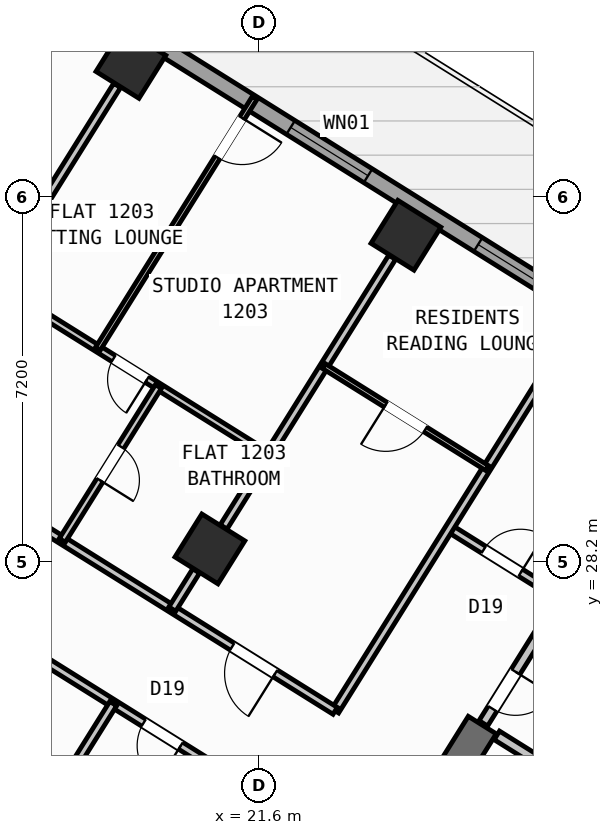
"""IFC4 building model, lengths in metres.
Left out: names, types, materials, properties, quantities, classifications, styles, units other than length and angle.
Written with IfcOpenShell. Run it as: python <this file> out.ifc"""

import sys

from ifc_helpers import new_model, si_unit, direction, frame, frame_2d, origin, origin_2d, place, context, subcontext, project, spatial, rectangle, hollow_rectangle, extrude, source, transform, mapped, element, fill, save


model = new_model("IFC4")
c1 = context("Model", 3, precision=1e-05, world=origin(), true_north=direction((0.0, 1.0)))
c2 = subcontext(c1, "Body", "Model", "MODEL_VIEW")
j1 = project(units=[si_unit("LENGTHUNIT", "METRE"), si_unit("PLANEANGLEUNIT", "RADIAN")], contexts=[c1])
p1 = place(None, origin())
s1 = spatial("IfcSite", under=j1, at=p1, CompositionType="ELEMENT")
p2 = place(p1, origin())
s2 = spatial("IfcBuilding", under=s1, at=p2, CompositionType="ELEMENT")
p3 = place(p2, frame((0.0, 0.0, 49.2)))
s3 = spatial("IfcBuildingStorey", under=s2, at=p3, CompositionType="ELEMENT", Elevation=49.2)
p4 = place(p3, frame((26.007, 24.976, 0.0), z_axis=(0.0, 0.0, 1.0), x_axis=(-0.529916319127, -0.848049936456, 0.0)))
e1 = element("IfcWall", 1, at=p4, inside=s3, PredefinedType="SHEAR", context=c2, shape_type="SweptSolid", body=[
    extrude(rectangle(XDim=6.375, YDim=0.65, at=frame_2d((3.188, 0.0))), origin(), (0.0, 0.0, 1.0), 3.35),
])
m1 = source(origin(), c2, "Body", "SweptSolid", [
    extrude(hollow_rectangle(XDim=1.0, YDim=1.0, WallThickness=0.04, at=origin_2d()), origin(), (0.0, 0.0, 1.0), 3.6),
])
for number, where, z_axis, x_axis in (
    (2, (24.5, 34.643, 0.0), (0.0, 0.0, 1.0), (-0.848, 0.53, 0.0)),
    (3, (20.632, 28.452, 0.0), (0.0, 0.0, 1.0), (-0.848, 0.53, 0.0)),
    (4, (19.073, 38.034, 0.0), (0.0, 0.0, 1.0), (-0.848, 0.53, 0.0)),
):
    element("IfcColumn", number, at=place(p3, frame(where, z_axis=z_axis, x_axis=x_axis)), inside=s3, PredefinedType="COLUMN", context=c2, shape_type="MappedRepresentation", body=[
        mapped(m1, transform((0.0, 0.0, 0.0), scale=1.0)),
    ])
p5 = place(p3, frame((14.138, 41.825, 0.0), z_axis=(0.0, 0.0, 1.0), x_axis=(0.848046498049, -0.529921821731, 0.0)))
e5 = element("IfcWall", 5, at=p5, inside=s3, PredefinedType="STANDARD", context=c2, shape_type="SweptSolid", body=[
    extrude(rectangle(XDim=31.588, YDim=0.32, at=frame_2d((15.794, 0.0))), origin(), (0.0, 0.0, 1.0), 3.35),
])
p6 = place(p5, frame((3.159, 0.0, 0.0)))
e6 = element("IfcOpeningElement", 6, at=p6, cuts=e5, PredefinedType="OPENING", context=c2, shape_type="SweptSolid", body=[
    extrude(rectangle(XDim=1.05, YDim=2.15, at=frame_2d((0.525, 1.075))), frame((0.0, 0.17, 0.0), z_axis=(0.0, -1.0, 0.0), x_axis=(1.0, 0.0, 0.0)), (0.0, 0.0, 1.0), 0.34),
])
p7 = place(p5, frame((0.906, 0.0, 1.0)))
e7 = element("IfcOpeningElement", 7, at=p7, cuts=e5, PredefinedType="OPENING", context=c2, shape_type="SweptSolid", body=[
    extrude(rectangle(XDim=0.9, YDim=1.25, at=frame_2d((0.45, 0.625))), frame((0.0, 0.17, 0.0), z_axis=(0.0, -1.0, 0.0), x_axis=(1.0, 0.0, 0.0)), (0.0, 0.0, 1.0), 0.34),
])
p8 = place(p5, frame((9.537, 0.0, 0.85)))
e8 = element("IfcOpeningElement", 8, at=p8, cuts=e5, PredefinedType="OPENING", context=c2, shape_type="SweptSolid", body=[
    extrude(rectangle(XDim=1.8, YDim=1.5, at=frame_2d((0.9, 0.75))), frame((0.0, 0.17, 0.0), z_axis=(0.0, -1.0, 0.0), x_axis=(1.0, 0.0, 0.0)), (0.0, 0.0, 1.0), 0.34),
])
p9 = place(p5, frame((13.899, 0.0, 0.85)))
e9 = element("IfcOpeningElement", 9, at=p9, cuts=e5, PredefinedType="OPENING", context=c2, shape_type="SweptSolid", body=[
    extrude(rectangle(XDim=1.5, YDim=1.5, at=frame_2d((0.75, 0.75))), frame((0.0, 0.17, 0.0), z_axis=(0.0, -1.0, 0.0), x_axis=(1.0, 0.0, 0.0)), (0.0, 0.0, 1.0), 0.34),
])
p10 = place(p5, frame((22.019, 0.0, 0.95)))
e10 = element("IfcOpeningElement", 10, at=p10, cuts=e5, PredefinedType="OPENING", context=c2, shape_type="SweptSolid", body=[
    extrude(rectangle(XDim=1.2, YDim=1.4, at=frame_2d((0.6, 0.7))), frame((0.0, 0.17, 0.0), z_axis=(0.0, -1.0, 0.0), x_axis=(1.0, 0.0, 0.0)), (0.0, 0.0, 1.0), 0.34),
])
p11 = place(p5, frame((27.569, 0.0, 0.95)))
e11 = element("IfcOpeningElement", 11, at=p11, cuts=e5, PredefinedType="OPENING", context=c2, shape_type="SweptSolid", body=[
    extrude(rectangle(XDim=1.2, YDim=1.4, at=frame_2d((0.6, 0.7))), frame((0.0, 0.17, 0.0), z_axis=(0.0, -1.0, 0.0), x_axis=(1.0, 0.0, 0.0)), (0.0, 0.0, 1.0), 0.34),
])
p12 = place(p3, frame((31.525, 21.504, 0.0), z_axis=(0.0, 0.0, 1.0), x_axis=(-0.848044998614, 0.529924221305, 0.0)))
e12 = element("IfcWall", 12, at=p12, inside=s3, PredefinedType="STANDARD", context=c2, shape_type="SweptSolid", body=[
    extrude(rectangle(XDim=6.168, YDim=0.2, at=frame_2d((3.084, 0.0))), origin(), (0.0, 0.0, 1.0), 3.34),
])
p13 = place(p12, frame((4.4, 0.0, 0.0)))
e13 = element("IfcOpeningElement", 13, at=p13, cuts=e12, PredefinedType="OPENING", context=c2, shape_type="SweptSolid", body=[
    extrude(rectangle(XDim=0.86, YDim=2.05, at=frame_2d((0.43, 1.025))), frame((0.0, 0.11, 0.0), z_axis=(0.0, -1.0, 0.0), x_axis=(1.0, 0.0, 0.0)), (0.0, 0.0, 1.0), 0.22),
])
p14 = place(p12, frame((0.35, 0.0, 0.0)))
e14 = element("IfcOpeningElement", 14, at=p14, cuts=e12, PredefinedType="OPENING", context=c2, shape_type="SweptSolid", body=[
    extrude(rectangle(XDim=0.86, YDim=2.05, at=frame_2d((0.43, 1.025))), frame((0.0, 0.11, 0.0), z_axis=(0.0, -1.0, 0.0), x_axis=(1.0, 0.0, 0.0)), (0.0, 0.0, 1.0), 0.22),
])
p15 = place(p3, frame((27.596, 27.52, 0.0), z_axis=(0.0, 0.0, 1.0), x_axis=(-0.529865479138, -0.848081702443, 0.0)))
e15 = element("IfcWall", 15, at=p15, inside=s3, PredefinedType="STANDARD", context=c2, shape_type="SweptSolid", body=[
    extrude(rectangle(XDim=2.96, YDim=0.2, at=frame_2d((1.48, 0.0))), origin(), (0.0, 0.0, 1.0), 3.34),
])
p16 = place(p15, frame((1.76, 0.0, 0.0)))
e16 = element("IfcOpeningElement", 16, at=p16, cuts=e15, PredefinedType="OPENING", context=c2, shape_type="SweptSolid", body=[
    extrude(rectangle(XDim=0.86, YDim=2.05, at=frame_2d((0.43, 1.025))), frame((0.0, 0.11, 0.0), z_axis=(0.0, -1.0, 0.0), x_axis=(1.0, 0.0, 0.0)), (0.0, 0.0, 1.0), 0.22),
])
p17 = place(p3, frame((27.57, 27.478, 0.0), z_axis=(0.0, 0.0, 1.0), x_axis=(-0.848050851465, 0.529914854792, 0.0)))
e17 = element("IfcWall", 17, at=p17, inside=s3, PredefinedType="PARTITIONING", context=c2, shape_type="SweptSolid", body=[
    extrude(rectangle(XDim=2.61, YDim=0.16, at=frame_2d((1.305, 0.0))), origin(), (0.0, 0.0, 1.0), 3.34),
])
p18 = place(p17, frame((0.95, 0.0, 0.0)))
e18 = element("IfcOpeningElement", 18, at=p18, cuts=e17, PredefinedType="OPENING", context=c2, shape_type="SweptSolid", body=[
    extrude(rectangle(XDim=0.86, YDim=2.05, at=frame_2d((0.43, 1.025))), frame((0.0, 0.09, 0.0), z_axis=(0.0, -1.0, 0.0), x_axis=(1.0, 0.0, 0.0)), (0.0, 0.0, 1.0), 0.18),
])
p19 = place(p3, frame((27.953, 33.016, 0.0), z_axis=(0.0, 0.0, 1.0), x_axis=(-0.529903001606, -0.848058257957, 0.0)))
e19 = element("IfcWall", 19, at=p19, inside=s3, PredefinedType="PARTITIONING", context=c2, shape_type="SweptSolid", body=[
    extrude(rectangle(XDim=9.15, YDim=0.16, at=frame_2d((4.575, 0.0))), origin(), (0.0, 0.0, 1.0), 3.34),
])
p20 = place(p3, frame((23.104, 25.256, 0.0), z_axis=(0.0, 0.0, 1.0), x_axis=(-0.848041752158, 0.529929416617, 0.0)))
e20 = element("IfcWall", 20, at=p20, inside=s3, PredefinedType="PARTITIONING", context=c2, shape_type="SweptSolid", body=[
    extrude(rectangle(XDim=16.73, YDim=0.16, at=frame_2d((8.365, 0.0))), origin(), (0.0, 0.0, 1.0), 3.34),
])
p21 = place(p20, frame((1.395, 0.0, 0.0)))
e21 = element("IfcOpeningElement", 21, at=p21, cuts=e20, PredefinedType="OPENING", context=c2, shape_type="SweptSolid", body=[
    extrude(rectangle(XDim=1.0, YDim=2.1, at=frame_2d((0.5, 1.05))), frame((0.0, 0.09, 0.0), z_axis=(0.0, -1.0, 0.0), x_axis=(1.0, 0.0, 0.0)), (0.0, 0.0, 1.0), 0.18),
])
p22 = place(p20, frame((7.82, 0.0, 0.0)))
e22 = element("IfcOpeningElement", 22, at=p22, cuts=e20, PredefinedType="OPENING", context=c2, shape_type="SweptSolid", body=[
    extrude(rectangle(XDim=1.0, YDim=2.1, at=frame_2d((0.5, 1.05))), frame((0.0, 0.09, 0.0), z_axis=(0.0, -1.0, 0.0), x_axis=(1.0, 0.0, 0.0)), (0.0, 0.0, 1.0), 0.18),
])
p23 = place(p20, frame((14.76, 0.0, 0.0)))
e23 = element("IfcOpeningElement", 23, at=p23, cuts=e20, PredefinedType="OPENING", context=c2, shape_type="SweptSolid", body=[
    extrude(rectangle(XDim=1.0, YDim=2.1, at=frame_2d((0.5, 1.05))), frame((0.0, 0.09, 0.0), z_axis=(0.0, -1.0, 0.0), x_axis=(1.0, 0.0, 0.0)), (0.0, 0.0, 1.0), 0.18),
])
p24 = place(p3, frame((21.938, 23.391, 0.0), z_axis=(0.0, 0.0, 1.0), x_axis=(-0.848045850158, 0.529922858565, 0.0)))
e24 = element("IfcWall", 24, at=p24, inside=s3, PredefinedType="PARTITIONING", context=c2, shape_type="SweptSolid", body=[
    extrude(rectangle(XDim=16.73, YDim=0.16, at=frame_2d((8.365, 0.0))), origin(), (0.0, 0.0, 1.0), 3.34),
])
p25 = place(p24, frame((2.22, 0.0, 0.0)))
e25 = element("IfcOpeningElement", 25, at=p25, cuts=e24, PredefinedType="OPENING", context=c2, shape_type="SweptSolid", body=[
    extrude(rectangle(XDim=0.86, YDim=2.05, at=frame_2d((0.43, 1.025))), frame((0.0, 0.09, 0.0), z_axis=(0.0, -1.0, 0.0), x_axis=(1.0, 0.0, 0.0)), (0.0, 0.0, 1.0), 0.18),
])
p26 = place(p24, frame((6.49, 0.0, 0.0)))
e26 = element("IfcOpeningElement", 26, at=p26, cuts=e24, PredefinedType="OPENING", context=c2, shape_type="SweptSolid", body=[
    extrude(rectangle(XDim=1.0, YDim=2.1, at=frame_2d((0.5, 1.05))), frame((0.0, 0.09, 0.0), z_axis=(0.0, -1.0, 0.0), x_axis=(1.0, 0.0, 0.0)), (0.0, 0.0, 1.0), 0.18),
])
p27 = place(p24, frame((11.14, 0.0, 0.0)))
e27 = element("IfcOpeningElement", 27, at=p27, cuts=e24, PredefinedType="OPENING", context=c2, shape_type="SweptSolid", body=[
    extrude(rectangle(XDim=1.0, YDim=2.1, at=frame_2d((0.5, 1.05))), frame((0.0, 0.09, 0.0), z_axis=(0.0, -1.0, 0.0), x_axis=(1.0, 0.0, 0.0)), (0.0, 0.0, 1.0), 0.18),
])
p28 = place(p3, frame((18.724, 25.399, 0.0), z_axis=(0.0, 0.0, 1.0), x_axis=(-0.529930102756, -0.848041323399, 0.0)))
e28 = element("IfcWall", 28, at=p28, inside=s3, PredefinedType="PARTITIONING", context=c2, shape_type="SweptSolid", body=[
    extrude(rectangle(XDim=3.188, YDim=0.16, at=frame_2d((1.594, 0.0))), origin(), (0.0, 0.0, 1.0), 2.725),
])
p29 = place(p3, frame((24.229, 34.209, 0.0), z_axis=(0.0, 0.0, 1.0), x_axis=(-0.529897533635, -0.848061674554, 0.0)))
e29 = element("IfcWall", 29, at=p29, inside=s3, PredefinedType="PARTITIONING", context=c2, shape_type="SweptSolid", body=[
    extrude(rectangle(XDim=6.276, YDim=0.16, at=frame_2d((3.138, 0.0))), origin(), (0.0, 0.0, 1.0), 2.725),
])
p30 = place(p3, frame((20.361, 28.018, 0.0), z_axis=(0.0, 0.0, 1.0), x_axis=(-0.529900064649, -0.848060093086, 0.0)))
e30 = element("IfcWall", 30, at=p30, inside=s3, PredefinedType="PARTITIONING", context=c2, shape_type="SweptSolid", body=[
    extrude(rectangle(XDim=0.888, YDim=0.16, at=frame_2d((0.444, 0.0))), origin(), (0.0, 0.0, 1.0), 2.725),
])
p31 = place(p3, frame((26.099, 30.05, 0.0), z_axis=(0.0, 0.0, 1.0), x_axis=(-0.84803087207, 0.529946827537, 0.0)))
e31 = element("IfcWall", 31, at=p31, inside=s3, PredefinedType="PARTITIONING", context=c2, shape_type="SweptSolid", body=[
    extrude(rectangle(XDim=3.79, YDim=0.11, at=frame_2d((1.895, 0.0))), origin(), (0.0, 0.0, 1.0), 3.34),
])
p32 = place(p31, frame((1.435, 0.0, 0.0)))
e32 = element("IfcOpeningElement", 32, at=p32, cuts=e31, PredefinedType="OPENING", context=c2, shape_type="SweptSolid", body=[
    extrude(rectangle(XDim=0.92, YDim=2.08, at=frame_2d((0.46, 1.04))), frame((0.0, 0.065, 0.0), z_axis=(0.0, -1.0, 0.0), x_axis=(1.0, 0.0, 0.0)), (0.0, 0.0, 1.0), 0.13),
])
p33 = place(p3, frame((18.802, 37.6, 0.0), z_axis=(0.0, 0.0, 1.0), x_axis=(-0.529915015264, -0.848050751193, 0.0)))
e33 = element("IfcWall", 33, at=p33, inside=s3, PredefinedType="PARTITIONING", context=c2, shape_type="SweptSolid", body=[
    extrude(rectangle(XDim=6.276, YDim=0.16, at=frame_2d((3.138, 0.0))), origin(), (0.0, 0.0, 1.0), 2.725),
])
p34 = place(p3, frame((21.787, 30.301, 0.0), z_axis=(0.0, 0.0, 1.0), x_axis=(-0.848049732085, 0.529916646191, 0.0)))
e34 = element("IfcWall", 34, at=p34, inside=s3, PredefinedType="PLUMBINGWALL", context=c2, shape_type="SweptSolid", body=[
    extrude(rectangle(XDim=6.4, YDim=0.14, at=frame_2d((3.2, 0.0))), origin(), (0.0, 0.0, 1.0), 3.34),
])
p35 = place(p34, frame((2.824, 0.0, 0.0)))
e35 = element("IfcOpeningElement", 35, at=p35, cuts=e34, PredefinedType="OPENING", context=c2, shape_type="SweptSolid", body=[
    extrude(rectangle(XDim=0.78, YDim=2.05, at=frame_2d((0.39, 1.025))), frame((0.0, 0.08, 0.0), z_axis=(0.0, -1.0, 0.0), x_axis=(1.0, 0.0, 0.0)), (0.0, 0.0, 1.0), 0.16),
])
p36 = place(p3, frame((19.616, 31.657, 0.0), z_axis=(0.0, 0.0, 1.0), x_axis=(-0.529876336437, -0.84807491891, 0.0)))
e36 = element("IfcWall", 36, at=p36, inside=s3, PredefinedType="PLUMBINGWALL", context=c2, shape_type="SweptSolid", body=[
    extrude(rectangle(XDim=3.58, YDim=0.14, at=frame_2d((1.79, 0.0))), origin(), (0.0, 0.0, 1.0), 3.34),
])
p37 = place(p36, frame((1.4, 0.0, 0.0)))
e37 = element("IfcOpeningElement", 37, at=p37, cuts=e36, PredefinedType="OPENING", context=c2, shape_type="SweptSolid", body=[
    extrude(rectangle(XDim=0.78, YDim=2.05, at=frame_2d((0.39, 1.025))), frame((0.0, 0.08, 0.0), z_axis=(0.0, -1.0, 0.0), x_axis=(1.0, 0.0, 0.0)), (0.0, 0.0, 1.0), 0.16),
])
p38 = place(p3, frame((21.517, 37.356, 0.0), z_axis=(0.0, 0.0, 1.0), x_axis=(-0.529916267533, -0.848049968695, 0.0)))
e38 = element("IfcWall", 38, at=p38, inside=s3, PredefinedType="PARTITIONING", context=c2, shape_type="SweptSolid", body=[
    extrude(rectangle(XDim=5.84, YDim=0.11, at=frame_2d((2.92, 0.0))), origin(), (0.0, 0.0, 1.0), 3.34),
])
p39 = place(p38, frame((0.47, 0.0, 0.0)))
e39 = element("IfcOpeningElement", 39, at=p39, cuts=e38, PredefinedType="OPENING", context=c2, shape_type="SweptSolid", body=[
    extrude(rectangle(XDim=0.92, YDim=2.08, at=frame_2d((0.46, 1.04))), frame((0.0, 0.065, 0.0), z_axis=(0.0, -1.0, 0.0), x_axis=(1.0, 0.0, 0.0)), (0.0, 0.0, 1.0), 0.13),
])
m2 = source(origin(), c2, "Body", "SweptSolid", [
    extrude(rectangle(XDim=1.8, YDim=1.5, at=frame_2d((0.9, 0.75))), frame((0.0, 0.03, 0.0), z_axis=(0.0, -1.0, 0.0), x_axis=(1.0, 0.0, 0.0)), (0.0, 0.0, 1.0), 0.06),
])
p40 = place(p8, origin())
e40 = element("IfcWindow", 40, at=p40, inside=s3, PartitioningType="SINGLE_PANEL", PredefinedType="WINDOW", context=c2, shape_type="MappedRepresentation", body=[
    mapped(m2, transform((0.0, 0.0, 0.0), scale=1.0)),
])
fill(e8, e40)
m3 = source(origin(), c2, "Body", "SweptSolid", [
    extrude(rectangle(XDim=1.5, YDim=1.5, at=frame_2d((0.75, 0.75))), frame((0.0, 0.03, 0.0), z_axis=(0.0, -1.0, 0.0), x_axis=(1.0, 0.0, 0.0)), (0.0, 0.0, 1.0), 0.06),
])
p41 = place(p9, origin())
e41 = element("IfcWindow", 41, at=p41, inside=s3, PartitioningType="SINGLE_PANEL", PredefinedType="WINDOW", context=c2, shape_type="MappedRepresentation", body=[
    mapped(m3, transform((0.0, 0.0, 0.0), scale=1.0)),
])
fill(e9, e41)
m4 = source(origin(), c2, "Body", "SweptSolid", [
    extrude(rectangle(XDim=0.86, YDim=2.05, at=frame_2d((0.43, 1.025))), frame((0.0, 0.025, 0.0), z_axis=(0.0, -1.0, 0.0), x_axis=(1.0, 0.0, 0.0)), (0.0, 0.0, 1.0), 0.05),
])
p42 = place(p18, frame((0.86, 0.0, 0.0), z_axis=(0.0, 0.0, 1.0), x_axis=(-1.0, 0.0, 0.0)))
e42 = element("IfcDoor", 42, at=p42, inside=s3, OperationType="SINGLE_SWING_RIGHT", PredefinedType="DOOR", context=c2, shape_type="MappedRepresentation", body=[
    mapped(m4, transform((0.0, 0.0, 0.0), scale=1.0)),
])
fill(e18, e42)
p43 = place(p16, origin())
e43 = element("IfcDoor", 43, at=p43, inside=s3, OperationType="SINGLE_SWING_LEFT", PredefinedType="DOOR", context=c2, shape_type="MappedRepresentation", body=[
    mapped(m4, transform((0.0, 0.0, 0.0), scale=1.0)),
])
fill(e16, e43)
p44 = place(p25, origin())
e44 = element("IfcDoor", 44, at=p44, inside=s3, OperationType="SINGLE_SWING_LEFT", PredefinedType="DOOR", context=c2, shape_type="MappedRepresentation", body=[
    mapped(m4, transform((0.0, 0.0, 0.0), scale=1.0)),
])
fill(e25, e44)
m5 = source(origin(), c2, "Body", "SweptSolid", [
    extrude(rectangle(XDim=1.0, YDim=2.1, at=frame_2d((0.5, 1.05))), frame((0.0, 0.025, 0.0), z_axis=(0.0, -1.0, 0.0), x_axis=(1.0, 0.0, 0.0)), (0.0, 0.0, 1.0), 0.05),
])
p45 = place(p21, origin())
e45 = element("IfcDoor", 45, at=p45, inside=s3, OperationType="SINGLE_SWING_LEFT", PredefinedType="DOOR", context=c2, shape_type="MappedRepresentation", body=[
    mapped(m5, transform((0.0, 0.0, 0.0), scale=1.0)),
])
fill(e21, e45)
m6 = source(origin(), c2, "Body", "SweptSolid", [
    extrude(rectangle(XDim=0.92, YDim=2.08, at=frame_2d((0.46, 1.04))), frame((0.0, 0.025, 0.0), z_axis=(0.0, -1.0, 0.0), x_axis=(1.0, 0.0, 0.0)), (0.0, 0.0, 1.0), 0.05),
])
p46 = place(p32, origin())
e46 = element("IfcDoor", 46, at=p46, inside=s3, OperationType="SINGLE_SWING_RIGHT", PredefinedType="DOOR", context=c2, shape_type="MappedRepresentation", body=[
    mapped(m6, transform((0.0, 0.0, 0.0), scale=1.0)),
])
fill(e32, e46)
p47 = place(p39, origin())
e47 = element("IfcDoor", 47, at=p47, inside=s3, OperationType="SINGLE_SWING_LEFT", PredefinedType="DOOR", context=c2, shape_type="MappedRepresentation", body=[
    mapped(m6, transform((0.0, 0.0, 0.0), scale=1.0)),
])
fill(e39, e47)
m7 = source(origin(), c2, "Body", "SweptSolid", [
    extrude(rectangle(XDim=0.78, YDim=2.05, at=frame_2d((0.39, 1.025))), frame((0.0, 0.025, 0.0), z_axis=(0.0, -1.0, 0.0), x_axis=(1.0, 0.0, 0.0)), (0.0, 0.0, 1.0), 0.05),
])
p48 = place(p35, origin())
e48 = element("IfcDoor", 48, at=p48, inside=s3, OperationType="SINGLE_SWING_LEFT", PredefinedType="DOOR", context=c2, shape_type="MappedRepresentation", body=[
    mapped(m7, transform((0.0, 0.0, 0.0), scale=1.0)),
])
fill(e35, e48)
p49 = place(p37, origin())
e49 = element("IfcDoor", 49, at=p49, inside=s3, OperationType="SINGLE_SWING_RIGHT", PredefinedType="DOOR", context=c2, shape_type="MappedRepresentation", body=[
    mapped(m7, transform((0.0, 0.0, 0.0), scale=1.0)),
])
fill(e37, e49)
save(model, sys.argv[1])
